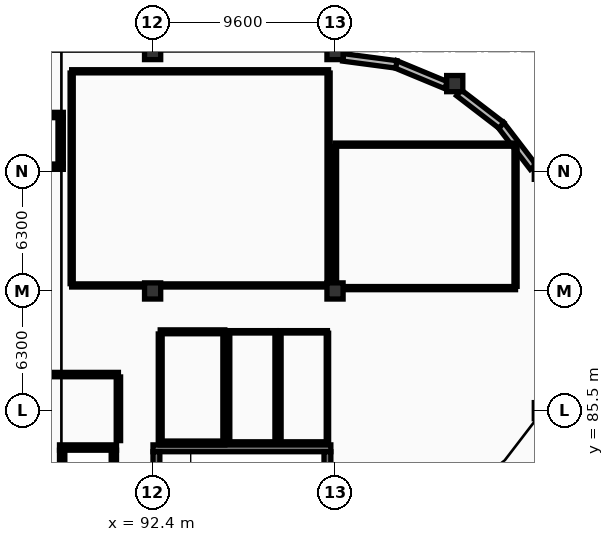
"""IFC4 building model, lengths in metres.
Left out: names, types, materials, properties, quantities, classifications, styles, units other than length and angle.
Written with IfcOpenShell. Run it as: python <this file> out.ifc"""

import sys

from ifc_helpers import new_model, si_unit, direction, frame, frame_2d, origin, origin_2d, place, context, subcontext, project, spatial, rectangle, circle, extrude, element, fill, save


model = new_model("IFC4")
c1 = context("Model", 3, precision=1e-05, world=origin(), true_north=direction((0.0, 1.0)))
c2 = subcontext(c1, "Body", "Model", "MODEL_VIEW")
j1 = project(units=[si_unit("LENGTHUNIT", "METRE"), si_unit("PLANEANGLEUNIT", "RADIAN")], contexts=[c1])
p1 = place(None, origin())
s1 = spatial("IfcSite", under=j1, at=p1, CompositionType="ELEMENT")
p2 = place(p1, origin())
s2 = spatial("IfcBuilding", under=s1, at=p2, CompositionType="ELEMENT")
p3 = place(p2, frame((0.0, 0.0, 5.4)))
s3 = spatial("IfcBuildingStorey", under=s2, at=p3, CompositionType="ELEMENT", Elevation=5.4)
for number, where, z_axis, x_axis in (
    (1, (92.4, 91.8, 0.0), (0.0, 0.0, 1.0), (1.0, 0.0, 0.0)),
    (2, (92.4, 104.4, 0.0), (0.0, 0.0, 1.0), (1.0, 0.0, 0.0)),
    (3, (102.0, 91.8, 0.0), (0.0, 0.0, 1.0), (1.0, 0.0, 0.0)),
    (4, (102.0, 104.4, 0.0), (0.0, 0.0, 1.0), (1.0, 0.0, 0.0)),
):
    element("IfcColumn", number, at=place(p3, frame(where, z_axis=z_axis, x_axis=x_axis)), inside=s3, PredefinedType="COLUMN", context=c2, shape_type="SweptSolid", body=[
        extrude(rectangle(XDim=0.85, YDim=0.85, at=origin_2d()), origin(), (0.0, 0.0, 1.0), 4.5),
    ])
for number, where, z_axis, x_axis in (
    (5, (112.912, 85.5, 0.0), (0.0, 0.0, 1.0), (1.0, 0.0, 0.0)),
    (6, (112.912, 98.1, 0.0), (0.0, 0.0, 1.0), (1.0, 0.0, 0.0)),
    (7, (108.3, 102.712, 0.0), (0.0, 0.0, 1.0), (1.0, 0.0, 0.0)),
):
    element("IfcColumn", number, at=place(p3, frame(where, z_axis=z_axis, x_axis=x_axis)), inside=s3, PredefinedType="COLUMN", context=c2, shape_type="SweptSolid", body=[
        extrude(circle(Radius=0.425, at=origin_2d()), origin(), (0.0, 0.0, 1.0), 4.5),
    ])
p4 = place(p3, frame((112.43, 98.317, 0.0), z_axis=(0.0, 0.0, 1.0), x_axis=(-0.608732750311, 0.793375345407, 0.0)))
e8 = element("IfcWall", 8, at=p4, inside=s3, PredefinedType="ELEMENTEDWALL", context=c2, shape_type="SweptSolid", body=[
    extrude(rectangle(XDim=2.824, YDim=0.395, at=frame_2d((1.412, 0.0))), origin(), (0.0, 0.0, 1.0), 3.37),
])
p5 = place(p3, frame((110.757, 100.511, 0.0), z_axis=(0.0, 0.0, 1.0), x_axis=(-0.793375345407, 0.608732750311, 0.0)))
e9 = element("IfcWall", 9, at=p5, inside=s3, PredefinedType="ELEMENTEDWALL", context=c2, shape_type="SweptSolid", body=[
    extrude(rectangle(XDim=2.824, YDim=0.395, at=frame_2d((1.412, 0.0))), origin(), (0.0, 0.0, 1.0), 3.27),
])
p6 = place(p5, frame((0.962, 0.0, 0.85)))
e10 = element("IfcOpeningElement", 10, at=p6, cuts=e9, PredefinedType="OPENING", context=c2, shape_type="SweptSolid", body=[
    extrude(rectangle(XDim=0.9, YDim=1.85, at=frame_2d((0.45, 0.925))), frame((0.0, 0.208, 0.0), z_axis=(0.0, -1.0, 0.0), x_axis=(1.0, 0.0, 0.0)), (0.0, 0.0, 1.0), 0.415),
])
p7 = place(p3, frame((107.837, 102.633, 0.0), z_axis=(0.0, 0.0, 1.0), x_axis=(-0.923854257916, 0.382744444937, 0.0)))
e11 = element("IfcWall", 11, at=p7, inside=s3, PredefinedType="ELEMENTEDWALL", context=c2, shape_type="SweptSolid", body=[
    extrude(rectangle(XDim=2.892, YDim=0.395, at=frame_2d((1.446, 0.0))), origin(), (0.0, 0.0, 1.0), 3.27),
])
p8 = place(p7, frame((1.03, 0.0, 0.85)))
e12 = element("IfcOpeningElement", 12, at=p8, cuts=e11, PredefinedType="OPENING", context=c2, shape_type="SweptSolid", body=[
    extrude(rectangle(XDim=0.9, YDim=1.85, at=frame_2d((0.45, 0.925))), frame((0.0, 0.208, 0.0), z_axis=(0.0, -1.0, 0.0), x_axis=(1.0, 0.0, 0.0)), (0.0, 0.0, 1.0), 0.415),
])
p9 = place(p3, frame((105.229, 103.723, 0.0), z_axis=(0.0, 0.0, 1.0), x_axis=(-0.991455178228, 0.130447803989, 0.0)))
e13 = element("IfcWall", 13, at=p9, inside=s3, PredefinedType="ELEMENTEDWALL", context=c2, shape_type="SweptSolid", body=[
    extrude(rectangle(XDim=2.824, YDim=0.395, at=frame_2d((1.412, 0.0))), origin(), (0.0, 0.0, 1.0), 3.37),
])
p10 = place(p9, frame((0.962, 0.0, 0.85)))
e14 = element("IfcOpeningElement", 14, at=p10, cuts=e13, PredefinedType="OPENING", context=c2, shape_type="SweptSolid", body=[
    extrude(rectangle(XDim=0.9, YDim=1.85, at=frame_2d((0.45, 0.925))), frame((0.0, 0.208, 0.0), z_axis=(0.0, -1.0, 0.0), x_axis=(1.0, 0.0, 0.0)), (0.0, 0.0, 1.0), 0.415),
])
p11 = place(p3, frame((92.42, 83.52, 0.0), z_axis=(0.0, 0.0, 1.0), x_axis=(1.0, 0.0, 0.0)))
e15 = element("IfcWall", 15, at=p11, inside=s3, PredefinedType="SHEAR", context=c2, shape_type="SweptSolid", body=[
    extrude(rectangle(XDim=9.36, YDim=0.36, at=frame_2d((4.68, 0.0))), origin(), (0.0, 0.0, 1.0), 4.24),
])
p12 = place(p3, frame((92.6, 79.98, 0.0), z_axis=(0.0, 0.0, 1.0), x_axis=(0.0, 1.0, 0.0)))
e16 = element("IfcWall", 16, at=p12, inside=s3, PredefinedType="SHEAR", context=c2, shape_type="SweptSolid", body=[
    extrude(rectangle(XDim=3.36, YDim=0.36, at=frame_2d((1.68, 0.0))), origin(), (0.0, 0.0, 1.0), 4.24),
])
p13 = place(p12, frame((1.08, 0.0, 0.0)))
e17 = element("IfcOpeningElement", 17, at=p13, cuts=e16, PredefinedType="OPENING", context=c2, shape_type="SweptSolid", body=[
    extrude(rectangle(XDim=1.2, YDim=2.2, at=frame_2d((0.6, 1.1))), frame((0.0, 0.19, 0.0), z_axis=(0.0, -1.0, 0.0), x_axis=(1.0, 0.0, 0.0)), (0.0, 0.0, 1.0), 0.38),
])
p14 = place(p3, frame((101.6, 83.34, 0.0), z_axis=(0.0, 0.0, 1.0), x_axis=(0.0, -1.0, 0.0)))
e18 = element("IfcWall", 18, at=p14, inside=s3, PredefinedType="SHEAR", context=c2, shape_type="SweptSolid", body=[
    extrude(rectangle(XDim=3.36, YDim=0.36, at=frame_2d((1.68, 0.0))), origin(), (0.0, 0.0, 1.0), 4.24),
])
p15 = place(p3, frame((87.5, 83.56, 0.0), z_axis=(0.0, 0.0, 1.0), x_axis=(1.0, 0.0, 0.0)))
e19 = element("IfcWall", 19, at=p15, inside=s3, PredefinedType="SHEAR", context=c2, shape_type="SweptSolid", body=[
    extrude(rectangle(XDim=3.0, YDim=0.28, at=frame_2d((1.5, 0.0))), origin(), (0.0, 0.0, 1.0), 4.24),
])
p16 = place(p15, frame((0.95, 0.0, 0.0)))
e20 = element("IfcOpeningElement", 20, at=p16, cuts=e19, PredefinedType="OPENING", context=c2, shape_type="SweptSolid", body=[
    extrude(rectangle(XDim=1.1, YDim=2.2, at=frame_2d((0.55, 1.1))), frame((0.0, 0.15, 0.0), z_axis=(0.0, -1.0, 0.0), x_axis=(1.0, 0.0, 0.0)), (0.0, 0.0, 1.0), 0.3),
])
for number, where, z_axis, x_axis in (
    (21, (87.64, 80.18, 0.0), (0.0, 0.0, 1.0), (0.0, 1.0, 0.0)),
    (22, (90.36, 83.42, 0.0), (0.0, 0.0, 1.0), (0.0, -1.0, 0.0)),
):
    element("IfcWall", number, at=place(p3, frame(where, z_axis=z_axis, x_axis=x_axis)), inside=s3, PredefinedType="SHEAR", context=c2, shape_type="SweptSolid", body=[
        extrude(rectangle(XDim=3.24, YDim=0.28, at=frame_2d((1.62, 0.0))), origin(), (0.0, 0.0, 1.0), 4.24),
    ])
p17 = place(p3, frame((84.54, 101.06, 0.0), z_axis=(0.0, 0.0, 1.0), x_axis=(1.0, 0.0, 0.0)))
e23 = element("IfcWall", 23, at=p17, inside=s3, PredefinedType="SHEAR", context=c2, shape_type="SweptSolid", body=[
    extrude(rectangle(XDim=3.16, YDim=0.28, at=frame_2d((1.58, 0.0))), origin(), (0.0, 0.0, 1.0), 4.24),
])
p18 = place(p3, frame((87.7, 98.34, 0.0), z_axis=(0.0, 0.0, 1.0), x_axis=(-1.0, 0.0, 0.0)))
e24 = element("IfcWall", 24, at=p18, inside=s3, PredefinedType="SHEAR", context=c2, shape_type="SweptSolid", body=[
    extrude(rectangle(XDim=3.16, YDim=0.28, at=frame_2d((1.58, 0.0))), origin(), (0.0, 0.0, 1.0), 4.24),
])
p19 = place(p18, frame((0.925, 0.0, 0.0)))
e25 = element("IfcOpeningElement", 25, at=p19, cuts=e24, PredefinedType="OPENING", context=c2, shape_type="SweptSolid", body=[
    extrude(rectangle(XDim=0.95, YDim=2.15, at=frame_2d((0.475, 1.075))), frame((0.0, 0.15, 0.0), z_axis=(0.0, -1.0, 0.0), x_axis=(1.0, 0.0, 0.0)), (0.0, 0.0, 1.0), 0.3),
])
p20 = place(p3, frame((87.56, 100.92, 0.0), z_axis=(0.0, 0.0, 1.0), x_axis=(0.0, -1.0, 0.0)))
e26 = element("IfcWall", 26, at=p20, inside=s3, PredefinedType="SHEAR", context=c2, shape_type="SweptSolid", body=[
    extrude(rectangle(XDim=2.44, YDim=0.28, at=frame_2d((1.22, 0.0))), origin(), (0.0, 0.0, 1.0), 4.24),
])
p21 = place(p3, frame((85.2, 87.4, 0.0), z_axis=(0.0, 0.0, 1.0), x_axis=(1.0, 0.0, 0.0)))
e27 = element("IfcWall", 27, at=p21, inside=s3, PredefinedType="STANDARD", context=c2, shape_type="SweptSolid", body=[
    extrude(rectangle(XDim=5.4, YDim=0.23, at=frame_2d((2.7, 0.0))), origin(), (0.0, 0.0, 1.0), 3.62),
])
p22 = place(p21, frame((2.05, 0.0, 0.0)))
e28 = element("IfcOpeningElement", 28, at=p22, cuts=e27, PredefinedType="OPENING", context=c2, shape_type="SweptSolid", body=[
    extrude(rectangle(XDim=1.3, YDim=2.2, at=frame_2d((0.65, 1.1))), frame((0.0, 0.125, 0.0), z_axis=(0.0, -1.0, 0.0), x_axis=(1.0, 0.0, 0.0)), (0.0, 0.0, 1.0), 0.25),
])
p23 = place(p3, frame((90.6, 87.275, 0.0), z_axis=(0.0, 0.0, 1.0), x_axis=(0.0, -1.0, 0.0)))
e29 = element("IfcWall", 29, at=p23, inside=s3, PredefinedType="STANDARD", context=c2, shape_type="SweptSolid", body=[
    extrude(rectangle(XDim=3.35, YDim=0.23, at=frame_2d((1.675, 0.0))), origin(), (0.0, 0.0, 1.0), 3.62),
])
p24 = place(p3, frame((96.4, 89.65, 0.0), z_axis=(0.0, 0.0, 1.0), x_axis=(1.0, 0.0, 0.0)))
e30 = element("IfcWall", 30, at=p24, inside=s3, PredefinedType="PARTITIONING", context=c2, shape_type="SweptSolid", body=[
    extrude(rectangle(XDim=2.5, YDim=0.125, at=frame_2d((1.25, 0.0))), origin(), (0.0, 0.0, 1.0), 4.225),
])
p25 = place(p24, frame((0.8, 0.0, 0.0)))
e31 = element("IfcOpeningElement", 31, at=p25, cuts=e30, PredefinedType="OPENING", context=c2, shape_type="SweptSolid", body=[
    extrude(rectangle(XDim=0.9, YDim=2.1, at=frame_2d((0.45, 1.05))), frame((0.0, 0.073, 0.0), z_axis=(0.0, -1.0, 0.0), x_axis=(1.0, 0.0, 0.0)), (0.0, 0.0, 1.0), 0.145),
])
p26 = place(p3, frame((98.9, 83.8, 0.0), z_axis=(0.0, 0.0, 1.0), x_axis=(-1.0, 0.0, 0.0)))
e32 = element("IfcWall", 32, at=p26, inside=s3, PredefinedType="PARTITIONING", context=c2, shape_type="SweptSolid", body=[
    extrude(rectangle(XDim=2.5, YDim=0.125, at=frame_2d((1.25, 0.0))), origin(), (0.0, 0.0, 1.0), 4.225),
])
for number, where, z_axis, x_axis in (
    (33, (96.4, 83.873, 0.0), (0.0, 0.0, 1.0), (0.0, 1.0, 0.0)),
    (34, (98.9, 89.577, 0.0), (0.0, 0.0, 1.0), (0.0, -1.0, 0.0)),
):
    element("IfcWall", number, at=place(p3, frame(where, z_axis=z_axis, x_axis=x_axis)), inside=s3, PredefinedType="PARTITIONING", context=c2, shape_type="SweptSolid", body=[
        extrude(rectangle(XDim=5.705, YDim=0.125, at=frame_2d((2.853, 0.0))), origin(), (0.0, 0.0, 1.0), 3.62),
    ])
p27 = place(p3, frame((99.1, 89.65, 0.0), z_axis=(0.0, 0.0, 1.0), x_axis=(1.0, 0.0, 0.0)))
e35 = element("IfcWall", 35, at=p27, inside=s3, PredefinedType="PARTITIONING", context=c2, shape_type="SweptSolid", body=[
    extrude(rectangle(XDim=2.5, YDim=0.125, at=frame_2d((1.25, 0.0))), origin(), (0.0, 0.0, 1.0), 3.37),
])
p28 = place(p27, frame((0.75, 0.0, 0.0)))
e36 = element("IfcOpeningElement", 36, at=p28, cuts=e35, PredefinedType="OPENING", context=c2, shape_type="SweptSolid", body=[
    extrude(rectangle(XDim=1.0, YDim=2.1, at=frame_2d((0.5, 1.05))), frame((0.0, 0.073, 0.0), z_axis=(0.0, -1.0, 0.0), x_axis=(1.0, 0.0, 0.0)), (0.0, 0.0, 1.0), 0.145),
])
p29 = place(p3, frame((101.6, 83.8, 0.0), z_axis=(0.0, 0.0, 1.0), x_axis=(-1.0, 0.0, 0.0)))
e37 = element("IfcWall", 37, at=p29, inside=s3, PredefinedType="PARTITIONING", context=c2, shape_type="SweptSolid", body=[
    extrude(rectangle(XDim=2.5, YDim=0.125, at=frame_2d((1.25, 0.0))), origin(), (0.0, 0.0, 1.0), 3.37),
])
p30 = place(p3, frame((99.1, 83.873, 0.0), z_axis=(0.0, 0.0, 1.0), x_axis=(0.0, 1.0, 0.0)))
e38 = element("IfcWall", 38, at=p30, inside=s3, PredefinedType="PARTITIONING", context=c2, shape_type="SweptSolid", body=[
    extrude(rectangle(XDim=5.705, YDim=0.125, at=frame_2d((2.853, 0.0))), origin(), (0.0, 0.0, 1.0), 3.62),
])
p31 = place(p3, frame((101.6, 89.577, 0.0), z_axis=(0.0, 0.0, 1.0), x_axis=(0.0, -1.0, 0.0)))
e39 = element("IfcWall", 39, at=p31, inside=s3, PredefinedType="PARTITIONING", context=c2, shape_type="SweptSolid", body=[
    extrude(rectangle(XDim=5.705, YDim=0.125, at=frame_2d((2.853, 0.0))), origin(), (0.0, 0.0, 1.0), 3.37),
])
p32 = place(p3, frame((92.8, 89.65, 0.0), z_axis=(0.0, 0.0, 1.0), x_axis=(1.0, 0.0, 0.0)))
e40 = element("IfcWall", 40, at=p32, inside=s3, PredefinedType="STANDARD", context=c2, shape_type="SweptSolid", body=[
    extrude(rectangle(XDim=3.4, YDim=0.205, at=frame_2d((1.7, 0.0))), origin(), (0.0, 0.0, 1.0), 3.37),
])
p33 = place(p32, frame((1.0, 0.0, 0.0)))
e41 = element("IfcOpeningElement", 41, at=p33, cuts=e40, PredefinedType="OPENING", context=c2, shape_type="SweptSolid", body=[
    extrude(rectangle(XDim=1.4, YDim=2.25, at=frame_2d((0.7, 1.125))), frame((0.0, 0.113, 0.0), z_axis=(0.0, -1.0, 0.0), x_axis=(1.0, 0.0, 0.0)), (0.0, 0.0, 1.0), 0.225),
])
p34 = place(p3, frame((96.2, 83.8, 0.0), z_axis=(0.0, 0.0, 1.0), x_axis=(-1.0, 0.0, 0.0)))
e42 = element("IfcWall", 42, at=p34, inside=s3, PredefinedType="STANDARD", context=c2, shape_type="SweptSolid", body=[
    extrude(rectangle(XDim=3.4, YDim=0.205, at=frame_2d((1.7, 0.0))), origin(), (0.0, 0.0, 1.0), 3.37),
])
p35 = place(p3, frame((92.8, 83.913, 0.0), z_axis=(0.0, 0.0, 1.0), x_axis=(0.0, 1.0, 0.0)))
e43 = element("IfcWall", 43, at=p35, inside=s3, PredefinedType="STANDARD", context=c2, shape_type="SweptSolid", body=[
    extrude(rectangle(XDim=5.625, YDim=0.205, at=frame_2d((2.812, 0.0))), origin(), (0.0, 0.0, 1.0), 3.37),
])
p36 = place(p3, frame((96.2, 89.538, 0.0), z_axis=(0.0, 0.0, 1.0), x_axis=(0.0, -1.0, 0.0)))
e44 = element("IfcWall", 44, at=p36, inside=s3, PredefinedType="STANDARD", context=c2, shape_type="SweptSolid", body=[
    extrude(rectangle(XDim=5.625, YDim=0.205, at=frame_2d((2.812, 0.0))), origin(), (0.0, 0.0, 1.0), 3.62),
])
p37 = place(p3, frame((88.14, 103.36, 0.0), z_axis=(0.0, 0.0, 1.0), x_axis=(1.0, 0.0, 0.0)))
e45 = element("IfcWall", 45, at=p37, inside=s3, PredefinedType="PARTITIONING", context=c2, shape_type="SweptSolid", body=[
    extrude(rectangle(XDim=13.52, YDim=0.165, at=frame_2d((6.76, 0.0))), origin(), (0.0, 0.0, 1.0), 3.37),
])
p38 = place(p3, frame((101.66, 92.09, 0.0), z_axis=(0.0, 0.0, 1.0), x_axis=(-1.0, 0.0, 0.0)))
e46 = element("IfcWall", 46, at=p38, inside=s3, PredefinedType="PARTITIONING", context=c2, shape_type="SweptSolid", body=[
    extrude(rectangle(XDim=13.52, YDim=0.165, at=frame_2d((6.76, 0.0))), origin(), (0.0, 0.0, 1.0), 3.37),
])
p39 = place(p38, frame((2.714, 0.0, 0.0)))
e47 = element("IfcOpeningElement", 47, at=p39, cuts=e46, PredefinedType="OPENING", context=c2, shape_type="SweptSolid", body=[
    extrude(rectangle(XDim=1.0, YDim=2.15, at=frame_2d((0.5, 1.075))), frame((0.0, 0.093, 0.0), z_axis=(0.0, -1.0, 0.0), x_axis=(1.0, 0.0, 0.0)), (0.0, 0.0, 1.0), 0.185),
])
p40 = place(p3, frame((88.14, 92.183, 0.0), z_axis=(0.0, 0.0, 1.0), x_axis=(0.0, 1.0, 0.0)))
e48 = element("IfcWall", 48, at=p40, inside=s3, PredefinedType="PARTITIONING", context=c2, shape_type="SweptSolid", body=[
    extrude(rectangle(XDim=11.085, YDim=0.165, at=frame_2d((5.542, 0.0))), origin(), (0.0, 0.0, 1.0), 3.57),
])
p41 = place(p3, frame((101.66, 103.268, 0.0), z_axis=(0.0, 0.0, 1.0), x_axis=(0.0, -1.0, 0.0)))
e49 = element("IfcWall", 49, at=p41, inside=s3, PredefinedType="PARTITIONING", context=c2, shape_type="SweptSolid", body=[
    extrude(rectangle(XDim=11.085, YDim=0.165, at=frame_2d((5.542, 0.0))), origin(), (0.0, 0.0, 1.0), 3.37),
])
p42 = place(p3, frame((102.0, 99.5, 0.0), z_axis=(0.0, 0.0, 1.0), x_axis=(1.0, 0.0, 0.0)))
e50 = element("IfcWall", 50, at=p42, inside=s3, PredefinedType="PARTITIONING", context=c2, shape_type="SweptSolid", body=[
    extrude(rectangle(XDim=9.5, YDim=0.165, at=frame_2d((4.75, 0.0))), origin(), (0.0, 0.0, 1.0), 3.27),
])
p43 = place(p3, frame((111.5, 91.95, 0.0), z_axis=(0.0, 0.0, 1.0), x_axis=(-1.0, 0.0, 0.0)))
e51 = element("IfcWall", 51, at=p43, inside=s3, PredefinedType="PARTITIONING", context=c2, shape_type="SweptSolid", body=[
    extrude(rectangle(XDim=9.5, YDim=0.165, at=frame_2d((4.75, 0.0))), origin(), (0.0, 0.0, 1.0), 3.27),
])
p44 = place(p43, frame((2.3, 0.0, 0.0)))
e52 = element("IfcOpeningElement", 52, at=p44, cuts=e51, PredefinedType="OPENING", context=c2, shape_type="SweptSolid", body=[
    extrude(rectangle(XDim=1.0, YDim=2.15, at=frame_2d((0.5, 1.075))), frame((0.0, 0.093, 0.0), z_axis=(0.0, -1.0, 0.0), x_axis=(1.0, 0.0, 0.0)), (0.0, 0.0, 1.0), 0.185),
])
for number, where, z_axis, x_axis in (
    (53, (102.0, 92.042, 0.0), (0.0, 0.0, 1.0), (0.0, 1.0, 0.0)),
    (54, (111.5, 99.407, 0.0), (0.0, 0.0, 1.0), (0.0, -1.0, 0.0)),
):
    element("IfcWall", number, at=place(p3, frame(where, z_axis=z_axis, x_axis=x_axis)), inside=s3, PredefinedType="PARTITIONING", context=c2, shape_type="SweptSolid", body=[
        extrude(rectangle(XDim=7.365, YDim=0.165, at=frame_2d((3.683, 0.0))), origin(), (0.0, 0.0, 1.0), 3.37),
    ])
p45 = place(p6, origin())
e55 = element("IfcWindow", 55, at=p45, inside=s3, PartitioningType="SINGLE_PANEL", PredefinedType="WINDOW", context=c2, shape_type="SweptSolid", body=[
    extrude(rectangle(XDim=0.9, YDim=1.85, at=frame_2d((0.45, 0.925))), frame((0.0, 0.03, 0.0), z_axis=(0.0, -1.0, 0.0), x_axis=(1.0, 0.0, 0.0)), (0.0, 0.0, 1.0), 0.06),
])
fill(e10, e55)
p46 = place(p8, origin())
e56 = element("IfcWindow", 56, at=p46, inside=s3, PartitioningType="SINGLE_PANEL", PredefinedType="WINDOW", context=c2, shape_type="SweptSolid", body=[
    extrude(rectangle(XDim=0.9, YDim=1.85, at=frame_2d((0.45, 0.925))), frame((0.0, 0.03, 0.0), z_axis=(0.0, -1.0, 0.0), x_axis=(1.0, 0.0, 0.0)), (0.0, 0.0, 1.0), 0.06),
])
fill(e12, e56)
p47 = place(p10, origin())
e57 = element("IfcWindow", 57, at=p47, inside=s3, PartitioningType="SINGLE_PANEL", PredefinedType="WINDOW", context=c2, shape_type="SweptSolid", body=[
    extrude(rectangle(XDim=0.9, YDim=1.85, at=frame_2d((0.45, 0.925))), frame((0.0, 0.03, 0.0), z_axis=(0.0, -1.0, 0.0), x_axis=(1.0, 0.0, 0.0)), (0.0, 0.0, 1.0), 0.06),
])
fill(e14, e57)
p48 = place(p16, origin())
e58 = element("IfcDoor", 58, at=p48, inside=s3, OperationType="DOUBLE_DOOR_SLIDING", PredefinedType="DOOR", context=c2, shape_type="SweptSolid", body=[
    extrude(rectangle(XDim=1.1, YDim=2.2, at=frame_2d((0.55, 1.1))), frame((0.0, 0.025, 0.0), z_axis=(0.0, -1.0, 0.0), x_axis=(1.0, 0.0, 0.0)), (0.0, 0.0, 1.0), 0.05),
])
fill(e20, e58)
p49 = place(p22, origin())
e59 = element("IfcDoor", 59, at=p49, inside=s3, OperationType="SINGLE_SWING_RIGHT", PredefinedType="DOOR", context=c2, shape_type="SweptSolid", body=[
    extrude(rectangle(XDim=1.3, YDim=2.2, at=frame_2d((0.65, 1.1))), frame((0.0, 0.025, 0.0), z_axis=(0.0, -1.0, 0.0), x_axis=(1.0, 0.0, 0.0)), (0.0, 0.0, 1.0), 0.05),
])
fill(e28, e59)
p50 = place(p25, origin())
e60 = element("IfcDoor", 60, at=p50, inside=s3, OperationType="SINGLE_SWING_LEFT", PredefinedType="DOOR", context=c2, shape_type="SweptSolid", body=[
    extrude(rectangle(XDim=0.9, YDim=2.1, at=frame_2d((0.45, 1.05))), frame((0.0, 0.025, 0.0), z_axis=(0.0, -1.0, 0.0), x_axis=(1.0, 0.0, 0.0)), (0.0, 0.0, 1.0), 0.05),
])
fill(e31, e60)
p51 = place(p28, origin())
e61 = element("IfcDoor", 61, at=p51, inside=s3, OperationType="SINGLE_SWING_RIGHT", PredefinedType="DOOR", context=c2, shape_type="SweptSolid", body=[
    extrude(rectangle(XDim=1.0, YDim=2.1, at=frame_2d((0.5, 1.05))), frame((0.0, 0.025, 0.0), z_axis=(0.0, -1.0, 0.0), x_axis=(1.0, 0.0, 0.0)), (0.0, 0.0, 1.0), 0.05),
])
fill(e36, e61)
p52 = place(p33, origin())
e62 = element("IfcDoor", 62, at=p52, inside=s3, OperationType="SINGLE_SWING_RIGHT", PredefinedType="DOOR", context=c2, shape_type="SweptSolid", body=[
    extrude(rectangle(XDim=1.4, YDim=2.25, at=frame_2d((0.7, 1.125))), frame((0.0, 0.025, 0.0), z_axis=(0.0, -1.0, 0.0), x_axis=(1.0, 0.0, 0.0)), (0.0, 0.0, 1.0), 0.05),
])
fill(e41, e62)
p53 = place(p39, origin())
e63 = element("IfcDoor", 63, at=p53, inside=s3, OperationType="SINGLE_SWING_RIGHT", PredefinedType="DOOR", context=c2, shape_type="SweptSolid", body=[
    extrude(rectangle(XDim=1.0, YDim=2.15, at=frame_2d((0.5, 1.075))), frame((0.0, 0.025, 0.0), z_axis=(0.0, -1.0, 0.0), x_axis=(1.0, 0.0, 0.0)), (0.0, 0.0, 1.0), 0.05),
])
fill(e47, e63)
p54 = place(p44, origin())
e64 = element("IfcDoor", 64, at=p54, inside=s3, OperationType="SINGLE_SWING_RIGHT", PredefinedType="DOOR", context=c2, shape_type="SweptSolid", body=[
    extrude(rectangle(XDim=1.0, YDim=2.15, at=frame_2d((0.5, 1.075))), frame((0.0, 0.025, 0.0), z_axis=(0.0, -1.0, 0.0), x_axis=(1.0, 0.0, 0.0)), (0.0, 0.0, 1.0), 0.05),
])
fill(e52, e64)
save(model, sys.argv[1])
